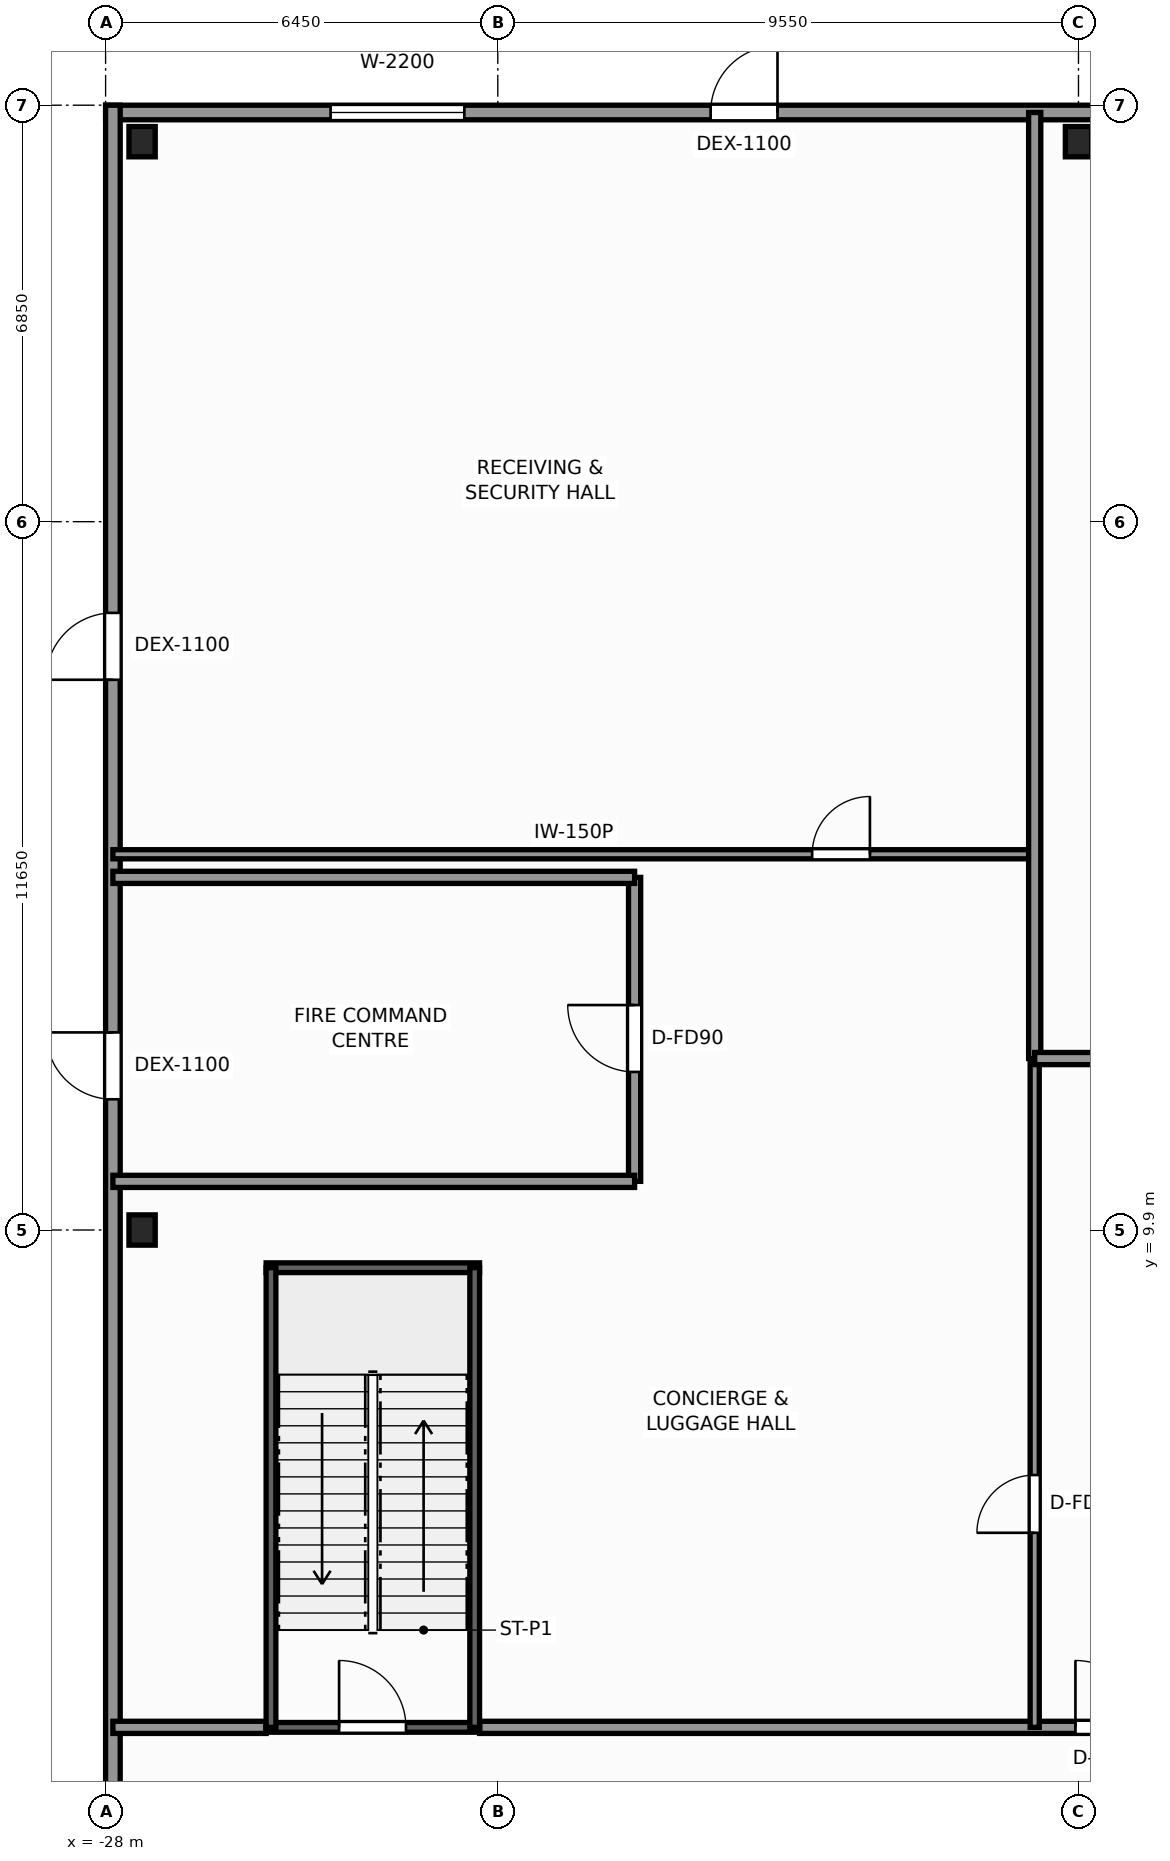
"""IFC4 building model, lengths in metres.
Left out: names, types, materials, properties, quantities, classifications, styles, units other than length and angle.
Written with IfcOpenShell. Run it as: python <this file> out.ifc"""

import sys

from ifc_helpers import new_model, si_unit, direction, frame, frame_2d, origin, origin_2d, place, context, subcontext, project, spatial, rectangle, i_section, extrude, element, fill, save


model = new_model("IFC4")
c1 = context("Model", 3, precision=1e-05, world=origin(), true_north=direction((0.0, 1.0)))
c2 = subcontext(c1, "Body", "Model", "MODEL_VIEW")
j1 = project(units=[si_unit("LENGTHUNIT", "METRE"), si_unit("PLANEANGLEUNIT", "RADIAN")], contexts=[c1])
p1 = place(None, origin())
s1 = spatial("IfcSite", under=j1, at=p1, CompositionType="ELEMENT")
p2 = place(p1, origin())
s2 = spatial("IfcBuilding", under=s1, at=p2, CompositionType="ELEMENT")
p3 = place(p2, origin())
s3 = spatial("IfcBuildingStorey", under=s2, at=p3, CompositionType="ELEMENT", Elevation=0.0)
for number, where, z_axis, x_axis in (
    (1, (-27.4, 9.9, 0.0), (0.0, 0.0, 1.0), (1.0, 0.0, 0.0)),
    (2, (-27.4, 27.8, 0.0), (0.0, 0.0, 1.0), (1.0, 0.0, 0.0)),
    (3, (-12.0, 27.8, 0.0), (0.0, 0.0, 1.0), (1.0, 0.0, 0.0)),
):
    element("IfcColumn", number, at=place(p3, frame(where, z_axis=z_axis, x_axis=x_axis)), inside=s3, PredefinedType="COLUMN", context=c2, shape_type="SweptSolid", body=[
        extrude(i_section(OverallWidth=0.432, OverallDepth=0.498, WebThickness=0.056, FlangeThickness=0.089, FilletRadius=0.025, at=origin_2d()), origin(), (0.0, 0.0, 1.0), 5.5),
    ])
p4 = place(p3, frame((-28.0, 28.28, 0.0), z_axis=(0.0, 0.0, 1.0), x_axis=(1.0, 0.0, 0.0)))
e4 = element("IfcWall", 4, at=p4, inside=s3, PredefinedType="STANDARD", context=c2, shape_type="SweptSolid", body=[
    extrude(rectangle(XDim=56.0, YDim=0.24, at=frame_2d((28.0, 0.0))), origin(), (0.0, 0.0, 1.0), 5.22),
])
p5 = place(p4, frame((18.4, 0.0, 0.0)))
e5 = element("IfcOpeningElement", 5, at=p5, cuts=e4, PredefinedType="OPENING", context=c2, shape_type="SweptSolid", body=[
    extrude(rectangle(XDim=3.6, YDim=3.8, at=frame_2d((1.8, 1.9))), frame((0.0, 0.13, 0.0), z_axis=(0.0, -1.0, 0.0), x_axis=(1.0, 0.0, 0.0)), (0.0, 0.0, 1.0), 0.26),
])
p6 = place(p4, frame((23.6, 0.0, 0.0)))
e6 = element("IfcOpeningElement", 6, at=p6, cuts=e4, PredefinedType="OPENING", context=c2, shape_type="SweptSolid", body=[
    extrude(rectangle(XDim=3.6, YDim=3.8, at=frame_2d((1.8, 1.9))), frame((0.0, 0.13, 0.0), z_axis=(0.0, -1.0, 0.0), x_axis=(1.0, 0.0, 0.0)), (0.0, 0.0, 1.0), 0.26),
])
p7 = place(p4, frame((28.8, 0.0, 0.0)))
e7 = element("IfcOpeningElement", 7, at=p7, cuts=e4, PredefinedType="OPENING", context=c2, shape_type="SweptSolid", body=[
    extrude(rectangle(XDim=3.6, YDim=3.8, at=frame_2d((1.8, 1.9))), frame((0.0, 0.13, 0.0), z_axis=(0.0, -1.0, 0.0), x_axis=(1.0, 0.0, 0.0)), (0.0, 0.0, 1.0), 0.26),
])
p8 = place(p4, frame((34.0, 0.0, 0.0)))
e8 = element("IfcOpeningElement", 8, at=p8, cuts=e4, PredefinedType="OPENING", context=c2, shape_type="SweptSolid", body=[
    extrude(rectangle(XDim=3.6, YDim=3.8, at=frame_2d((1.8, 1.9))), frame((0.0, 0.13, 0.0), z_axis=(0.0, -1.0, 0.0), x_axis=(1.0, 0.0, 0.0)), (0.0, 0.0, 1.0), 0.26),
])
p9 = place(p4, frame((43.4, 0.0, 0.0)))
e9 = element("IfcOpeningElement", 9, at=p9, cuts=e4, PredefinedType="OPENING", context=c2, shape_type="SweptSolid", body=[
    extrude(rectangle(XDim=3.6, YDim=3.8, at=frame_2d((1.8, 1.9))), frame((0.0, 0.13, 0.0), z_axis=(0.0, -1.0, 0.0), x_axis=(1.0, 0.0, 0.0)), (0.0, 0.0, 1.0), 0.26),
])
p10 = place(p4, frame((9.95, 0.0, 0.0)))
e10 = element("IfcOpeningElement", 10, at=p10, cuts=e4, PredefinedType="OPENING", context=c2, shape_type="SweptSolid", body=[
    extrude(rectangle(XDim=1.1, YDim=2.2, at=frame_2d((0.55, 1.1))), frame((0.0, 0.13, 0.0), z_axis=(0.0, -1.0, 0.0), x_axis=(1.0, 0.0, 0.0)), (0.0, 0.0, 1.0), 0.26),
])
p11 = place(p4, frame((49.85, 0.0, 0.0)))
e11 = element("IfcOpeningElement", 11, at=p11, cuts=e4, PredefinedType="OPENING", context=c2, shape_type="SweptSolid", body=[
    extrude(rectangle(XDim=1.1, YDim=2.2, at=frame_2d((0.55, 1.1))), frame((0.0, 0.13, 0.0), z_axis=(0.0, -1.0, 0.0), x_axis=(1.0, 0.0, 0.0)), (0.0, 0.0, 1.0), 0.26),
])
p12 = place(p4, frame((3.7, 0.0, 1.1)))
e12 = element("IfcOpeningElement", 12, at=p12, cuts=e4, PredefinedType="OPENING", context=c2, shape_type="SweptSolid", body=[
    extrude(rectangle(XDim=2.2, YDim=2.8, at=frame_2d((1.1, 1.4))), frame((0.0, 0.13, 0.0), z_axis=(0.0, -1.0, 0.0), x_axis=(1.0, 0.0, 0.0)), (0.0, 0.0, 1.0), 0.26),
])
p13 = place(p4, frame((51.7, 0.0, 1.1)))
e13 = element("IfcOpeningElement", 13, at=p13, cuts=e4, PredefinedType="OPENING", context=c2, shape_type="SweptSolid", body=[
    extrude(rectangle(XDim=2.2, YDim=2.8, at=frame_2d((1.1, 1.4))), frame((0.0, 0.13, 0.0), z_axis=(0.0, -1.0, 0.0), x_axis=(1.0, 0.0, 0.0)), (0.0, 0.0, 1.0), 0.26),
])
p14 = place(p3, frame((-27.88, -28.4, 0.0), z_axis=(0.0, 0.0, 1.0), x_axis=(0.0, 1.0, 0.0)))
e14 = element("IfcWall", 14, at=p14, inside=s3, PredefinedType="STANDARD", context=c2, shape_type="SweptSolid", body=[
    extrude(rectangle(XDim=56.8, YDim=0.24, at=frame_2d((28.4, 0.0))), origin(), (0.0, 0.0, 1.0), 4.748),
])
p15 = place(p14, frame((26.85, 0.0, 0.0)))
e15 = element("IfcOpeningElement", 15, at=p15, cuts=e14, PredefinedType="OPENING", context=c2, shape_type="SweptSolid", body=[
    extrude(rectangle(XDim=1.1, YDim=2.2, at=frame_2d((0.55, 1.1))), frame((0.0, 0.13, 0.0), z_axis=(0.0, -1.0, 0.0), x_axis=(1.0, 0.0, 0.0)), (0.0, 0.0, 1.0), 0.26),
])
p16 = place(p14, frame((40.45, 0.0, 0.0)))
e16 = element("IfcOpeningElement", 16, at=p16, cuts=e14, PredefinedType="OPENING", context=c2, shape_type="SweptSolid", body=[
    extrude(rectangle(XDim=1.1, YDim=2.2, at=frame_2d((0.55, 1.1))), frame((0.0, 0.13, 0.0), z_axis=(0.0, -1.0, 0.0), x_axis=(1.0, 0.0, 0.0)), (0.0, 0.0, 1.0), 0.26),
])
p17 = place(p14, frame((47.35, 0.0, 0.0)))
e17 = element("IfcOpeningElement", 17, at=p17, cuts=e14, PredefinedType="OPENING", context=c2, shape_type="SweptSolid", body=[
    extrude(rectangle(XDim=1.1, YDim=2.2, at=frame_2d((0.55, 1.1))), frame((0.0, 0.13, 0.0), z_axis=(0.0, -1.0, 0.0), x_axis=(1.0, 0.0, 0.0)), (0.0, 0.0, 1.0), 0.26),
])
p18 = place(p14, frame((6.0, 0.0, 0.75)))
e18 = element("IfcOpeningElement", 18, at=p18, cuts=e14, PredefinedType="OPENING", context=c2, shape_type="SweptSolid", body=[
    extrude(rectangle(XDim=1.8, YDim=2.4, at=frame_2d((0.9, 1.2))), frame((0.0, 0.13, 0.0), z_axis=(0.0, -1.0, 0.0), x_axis=(1.0, 0.0, 0.0)), (0.0, 0.0, 1.0), 0.26),
])
p19 = place(p14, frame((11.0, 0.0, 0.75)))
e19 = element("IfcOpeningElement", 19, at=p19, cuts=e14, PredefinedType="OPENING", context=c2, shape_type="SweptSolid", body=[
    extrude(rectangle(XDim=1.8, YDim=2.4, at=frame_2d((0.9, 1.2))), frame((0.0, 0.13, 0.0), z_axis=(0.0, -1.0, 0.0), x_axis=(1.0, 0.0, 0.0)), (0.0, 0.0, 1.0), 0.26),
])
p20 = place(p14, frame((21.7, 0.0, 0.75)))
e20 = element("IfcOpeningElement", 20, at=p20, cuts=e14, PredefinedType="OPENING", context=c2, shape_type="SweptSolid", body=[
    extrude(rectangle(XDim=1.8, YDim=2.4, at=frame_2d((0.9, 1.2))), frame((0.0, 0.13, 0.0), z_axis=(0.0, -1.0, 0.0), x_axis=(1.0, 0.0, 0.0)), (0.0, 0.0, 1.0), 0.26),
])
p21 = place(p3, frame((-27.88, 1.72, 0.0), z_axis=(0.0, 0.0, 1.0), x_axis=(1.0, 0.0, 0.0)))
e21 = element("IfcWall", 21, at=p21, inside=s3, PredefinedType="SOLIDWALL", context=c2, shape_type="SweptSolid", body=[
    extrude(rectangle(XDim=2.52, YDim=0.2, at=frame_2d((1.26, 0.0))), origin(), (0.0, 0.0, 1.0), 4.589),
])
p22 = place(p3, frame((-21.85, 1.72, 0.0), z_axis=(0.0, 0.0, 1.0), x_axis=(1.0, 0.0, 0.0)))
e22 = element("IfcWall", 22, at=p22, inside=s3, PredefinedType="SOLIDWALL", context=c2, shape_type="SweptSolid", body=[
    extrude(rectangle(XDim=11.95, YDim=0.2, at=frame_2d((5.975, 0.0))), origin(), (0.0, 0.0, 1.0), 5.22),
])
p23 = place(p22, frame((9.8, 0.0, 0.0)))
e23 = element("IfcOpeningElement", 23, at=p23, cuts=e22, PredefinedType="OPENING", context=c2, shape_type="SweptSolid", body=[
    extrude(rectangle(XDim=1.1, YDim=2.2, at=frame_2d((0.55, 1.1))), frame((0.0, 0.11, 0.0), z_axis=(0.0, -1.0, 0.0), x_axis=(1.0, 0.0, 0.0)), (0.0, 0.0, 1.0), 0.22),
])
p24 = place(p3, frame((-19.3, 10.7, 0.0), z_axis=(0.0, 0.0, 1.0), x_axis=(0.0, 1.0, 0.0)))
e24 = element("IfcWall", 24, at=p24, inside=s3, PredefinedType="SOLIDWALL", context=c2, shape_type="SweptSolid", body=[
    extrude(rectangle(XDim=5.0, YDim=0.2, at=frame_2d((2.5, 0.0))), origin(), (0.0, 0.0, 1.0), 5.22),
])
p25 = place(p24, frame((1.8, 0.0, 0.0)))
e25 = element("IfcOpeningElement", 25, at=p25, cuts=e24, PredefinedType="OPENING", context=c2, shape_type="SweptSolid", body=[
    extrude(rectangle(XDim=1.1, YDim=2.2, at=frame_2d((0.55, 1.1))), frame((0.0, 0.11, 0.0), z_axis=(0.0, -1.0, 0.0), x_axis=(1.0, 0.0, 0.0)), (0.0, 0.0, 1.0), 0.22),
])
for number, where, z_axis, x_axis in (
    (26, (-27.88, 10.7, 0.0), (0.0, 0.0, 1.0), (1.0, 0.0, 0.0)),
    (27, (-27.88, 15.7, 0.0), (0.0, 0.0, 1.0), (1.0, 0.0, 0.0)),
):
    element("IfcWall", number, at=place(p3, frame(where, z_axis=z_axis, x_axis=x_axis)), inside=s3, PredefinedType="SOLIDWALL", context=c2, shape_type="SweptSolid", body=[
        extrude(rectangle(XDim=8.58, YDim=0.2, at=frame_2d((4.29, 0.0))), origin(), (0.0, 0.0, 1.0), 4.589),
    ])
p26 = place(p3, frame((-12.72, 1.72, 0.0), z_axis=(0.0, 0.0, 1.0), x_axis=(0.0, 1.0, 0.0)))
e28 = element("IfcWall", 28, at=p26, inside=s3, PredefinedType="PARTITIONING", context=c2, shape_type="SweptSolid", body=[
    extrude(rectangle(XDim=11.0, YDim=0.15, at=frame_2d((5.5, 0.0))), origin(), (0.0, 0.0, 1.0), 4.278),
])
p27 = place(p26, frame((3.2, 0.0, 0.0)))
e29 = element("IfcOpeningElement", 29, at=p27, cuts=e28, PredefinedType="OPENING", context=c2, shape_type="SweptSolid", body=[
    extrude(rectangle(XDim=0.95, YDim=2.06, at=frame_2d((0.475, 1.03))), frame((0.0, 0.085, 0.0), z_axis=(0.0, -1.0, 0.0), x_axis=(1.0, 0.0, 0.0)), (0.0, 0.0, 1.0), 0.17),
])
p28 = place(p3, frame((-27.88, 16.08, 0.0), z_axis=(0.0, 0.0, 1.0), x_axis=(1.0, 0.0, 0.0)))
e30 = element("IfcWall", 30, at=p28, inside=s3, PredefinedType="PARTITIONING", context=c2, shape_type="SweptSolid", body=[
    extrude(rectangle(XDim=15.16, YDim=0.15, at=frame_2d((7.58, 0.0))), origin(), (0.0, 0.0, 1.0), 4.589),
])
p29 = place(p28, frame((11.5, 0.0, 0.0)))
e31 = element("IfcOpeningElement", 31, at=p29, cuts=e30, PredefinedType="OPENING", context=c2, shape_type="SweptSolid", body=[
    extrude(rectangle(XDim=0.95, YDim=2.06, at=frame_2d((0.475, 1.03))), frame((0.0, 0.085, 0.0), z_axis=(0.0, -1.0, 0.0), x_axis=(1.0, 0.0, 0.0)), (0.0, 0.0, 1.0), 0.17),
])
p30 = place(p3, frame((-12.72, 12.72, 0.0), z_axis=(0.0, 0.0, 1.0), x_axis=(0.0, 1.0, 0.0)))
e32 = element("IfcWall", 32, at=p30, inside=s3, PredefinedType="SOLIDWALL", context=c2, shape_type="SweptSolid", body=[
    extrude(rectangle(XDim=15.56, YDim=0.2, at=frame_2d((7.78, 0.0))), origin(), (0.0, 0.0, 1.0), 4.589),
])
p31 = place(p3, frame((-12.72, 12.72, 0.0), z_axis=(0.0, 0.0, 1.0), x_axis=(1.0, 0.0, 0.0)))
e33 = element("IfcWall", 33, at=p31, inside=s3, PredefinedType="SOLIDWALL", context=c2, shape_type="SweptSolid", body=[
    extrude(rectangle(XDim=25.44, YDim=0.2, at=frame_2d((12.72, 0.0))), origin(), (0.0, 0.0, 1.0), 4.278),
])
p32 = place(p31, frame((18.5, 0.0, 0.0)))
e34 = element("IfcOpeningElement", 34, at=p32, cuts=e33, PredefinedType="OPENING", context=c2, shape_type="SweptSolid", body=[
    extrude(rectangle(XDim=1.1, YDim=2.2, at=frame_2d((0.55, 1.1))), frame((0.0, 0.11, 0.0), z_axis=(0.0, -1.0, 0.0), x_axis=(1.0, 0.0, 0.0)), (0.0, 0.0, 1.0), 0.22),
])
p33 = place(p3, frame((-25.36, 1.72, 0.0), z_axis=(0.0, 0.0, 1.0), x_axis=(1.0, 0.0, 0.0)))
e35 = element("IfcWall", 35, at=p33, inside=s3, PredefinedType="SHEAR", context=c2, shape_type="SweptSolid", body=[
    extrude(rectangle(XDim=3.51, YDim=0.16, at=frame_2d((1.755, 0.0))), origin(), (0.0, 0.0, 1.0), 5.5),
])
p34 = place(p33, frame((1.2, 0.0, 0.0)))
e36 = element("IfcOpeningElement", 36, at=p34, cuts=e35, PredefinedType="OPENING", context=c2, shape_type="SweptSolid", body=[
    extrude(rectangle(XDim=1.1, YDim=2.2, at=frame_2d((0.55, 1.1))), frame((0.0, 0.09, 0.0), z_axis=(0.0, -1.0, 0.0), x_axis=(1.0, 0.0, 0.0)), (0.0, 0.0, 1.0), 0.18),
])
p35 = place(p3, frame((-25.36, 9.28, 0.0), z_axis=(0.0, 0.0, 1.0), x_axis=(1.0, 0.0, 0.0)))
e37 = element("IfcWall", 37, at=p35, inside=s3, PredefinedType="SHEAR", context=c2, shape_type="SweptSolid", body=[
    extrude(rectangle(XDim=3.51, YDim=0.16, at=frame_2d((1.755, 0.0))), origin(), (0.0, 0.0, 1.0), 5.5),
])
for number, where, z_axis, x_axis in (
    (38, (-25.28, 1.72, 0.0), (0.0, 0.0, 1.0), (0.0, 1.0, 0.0)),
    (39, (-21.93, 1.72, 0.0), (0.0, 0.0, 1.0), (0.0, 1.0, 0.0)),
):
    element("IfcWall", number, at=place(p3, frame(where, z_axis=z_axis, x_axis=x_axis)), inside=s3, PredefinedType="SHEAR", context=c2, shape_type="SweptSolid", body=[
        extrude(rectangle(XDim=7.56, YDim=0.16, at=frame_2d((3.78, 0.0))), origin(), (0.0, 0.0, 1.0), 5.5),
    ])
p36 = place(p10, origin())
e40 = element("IfcDoor", 40, at=p36, inside=s3, OperationType="SINGLE_SWING_RIGHT", PredefinedType="DOOR", context=c2, shape_type="SweptSolid", body=[
    extrude(rectangle(XDim=1.1, YDim=2.2, at=frame_2d((0.55, 1.1))), frame((0.0, 0.025, 0.0), z_axis=(0.0, -1.0, 0.0), x_axis=(1.0, 0.0, 0.0)), (0.0, 0.0, 1.0), 0.05),
])
fill(e10, e40)
p37 = place(p12, origin())
e41 = element("IfcWindow", 41, at=p37, inside=s3, PartitioningType="SINGLE_PANEL", PredefinedType="WINDOW", context=c2, shape_type="SweptSolid", body=[
    extrude(rectangle(XDim=2.2, YDim=2.8, at=frame_2d((1.1, 1.4))), frame((0.0, 0.03, 0.0), z_axis=(0.0, -1.0, 0.0), x_axis=(1.0, 0.0, 0.0)), (0.0, 0.0, 1.0), 0.06),
])
fill(e12, e41)
p38 = place(p16, origin())
e42 = element("IfcDoor", 42, at=p38, inside=s3, OperationType="SINGLE_SWING_RIGHT", PredefinedType="DOOR", context=c2, shape_type="SweptSolid", body=[
    extrude(rectangle(XDim=1.1, YDim=2.2, at=frame_2d((0.55, 1.1))), frame((0.0, 0.025, 0.0), z_axis=(0.0, -1.0, 0.0), x_axis=(1.0, 0.0, 0.0)), (0.0, 0.0, 1.0), 0.05),
])
fill(e16, e42)
p39 = place(p17, origin())
e43 = element("IfcDoor", 43, at=p39, inside=s3, OperationType="SINGLE_SWING_LEFT", PredefinedType="DOOR", context=c2, shape_type="SweptSolid", body=[
    extrude(rectangle(XDim=1.1, YDim=2.2, at=frame_2d((0.55, 1.1))), frame((0.0, 0.025, 0.0), z_axis=(0.0, -1.0, 0.0), x_axis=(1.0, 0.0, 0.0)), (0.0, 0.0, 1.0), 0.05),
])
fill(e17, e43)
p40 = place(p23, origin())
e44 = element("IfcDoor", 44, at=p40, inside=s3, OperationType="SINGLE_SWING_LEFT", PredefinedType="DOOR", context=c2, shape_type="SweptSolid", body=[
    extrude(rectangle(XDim=1.1, YDim=2.2, at=frame_2d((0.55, 1.1))), frame((0.0, 0.025, 0.0), z_axis=(0.0, -1.0, 0.0), x_axis=(1.0, 0.0, 0.0)), (0.0, 0.0, 1.0), 0.05),
])
fill(e23, e44)
p41 = place(p25, origin())
e45 = element("IfcDoor", 45, at=p41, inside=s3, OperationType="SINGLE_SWING_RIGHT", PredefinedType="DOOR", context=c2, shape_type="SweptSolid", body=[
    extrude(rectangle(XDim=1.1, YDim=2.2, at=frame_2d((0.55, 1.1))), frame((0.0, 0.025, 0.0), z_axis=(0.0, -1.0, 0.0), x_axis=(1.0, 0.0, 0.0)), (0.0, 0.0, 1.0), 0.05),
])
fill(e25, e45)
p42 = place(p27, origin())
e46 = element("IfcDoor", 46, at=p42, inside=s3, OperationType="SINGLE_SWING_LEFT", PredefinedType="DOOR", context=c2, shape_type="SweptSolid", body=[
    extrude(rectangle(XDim=0.95, YDim=2.06, at=frame_2d((0.475, 1.03))), frame((0.0, 0.025, 0.0), z_axis=(0.0, -1.0, 0.0), x_axis=(1.0, 0.0, 0.0)), (0.0, 0.0, 1.0), 0.05),
])
fill(e29, e46)
p43 = place(p29, origin())
e47 = element("IfcDoor", 47, at=p43, inside=s3, OperationType="SINGLE_SWING_RIGHT", PredefinedType="DOOR", context=c2, shape_type="SweptSolid", body=[
    extrude(rectangle(XDim=0.95, YDim=2.06, at=frame_2d((0.475, 1.03))), frame((0.0, 0.025, 0.0), z_axis=(0.0, -1.0, 0.0), x_axis=(1.0, 0.0, 0.0)), (0.0, 0.0, 1.0), 0.05),
])
fill(e31, e47)
p44 = place(p34, origin())
e48 = element("IfcDoor", 48, at=p44, inside=s3, OperationType="SINGLE_SWING_LEFT", PredefinedType="DOOR", context=c2, shape_type="SweptSolid", body=[
    extrude(rectangle(XDim=1.1, YDim=2.2, at=frame_2d((0.55, 1.1))), frame((0.0, 0.025, 0.0), z_axis=(0.0, -1.0, 0.0), x_axis=(1.0, 0.0, 0.0)), (0.0, 0.0, 1.0), 0.05),
])
fill(e36, e48)
save(model, sys.argv[1])
